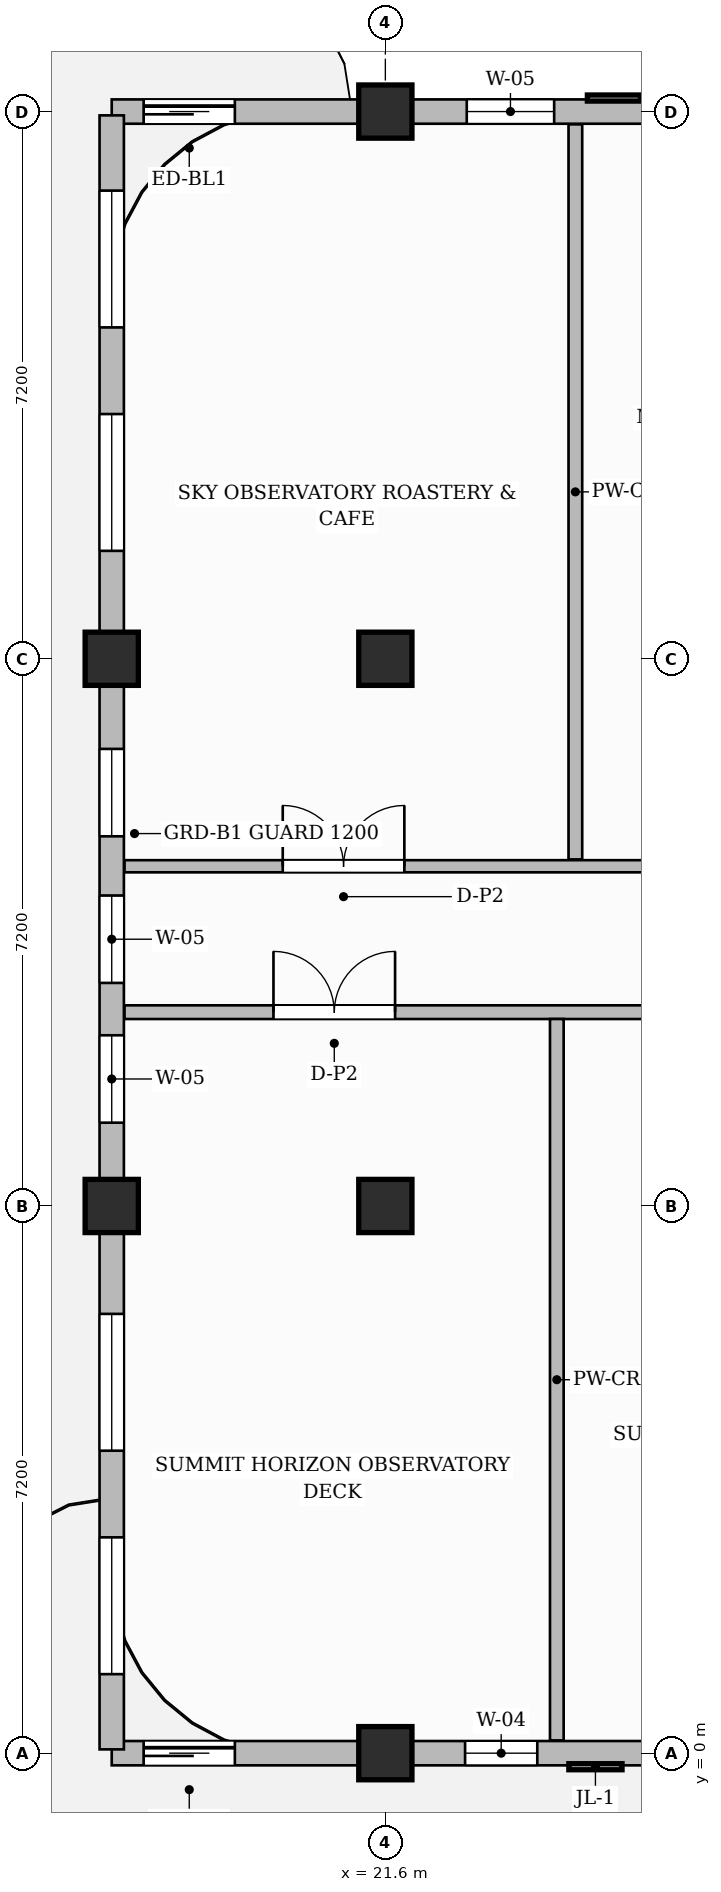
"""IFC4 building model, lengths in metres.
Left out: names, types, materials, properties, quantities, classifications, styles, units other than length and angle.
Written with IfcOpenShell. Run it as: python <this file> out.ifc"""

import sys

from ifc_helpers import new_model, si_unit, direction, frame, frame_2d, origin, origin_2d, place, context, subcontext, project, spatial, rectangle, extrude, source, transform, mapped, element, fill, save


model = new_model("IFC4")
c1 = context("Model", 3, precision=1e-05, world=origin(), true_north=direction((0.0, 1.0)))
c2 = subcontext(c1, "Body", "Model", "MODEL_VIEW")
j1 = project(units=[si_unit("LENGTHUNIT", "METRE"), si_unit("PLANEANGLEUNIT", "RADIAN")], contexts=[c1])
p1 = place(None, origin())
s1 = spatial("IfcSite", under=j1, at=p1, CompositionType="ELEMENT")
p2 = place(p1, origin())
s2 = spatial("IfcBuilding", under=s1, at=p2, CompositionType="ELEMENT")
p3 = place(p2, frame((0.0, 0.0, 294.3)))
s3 = spatial("IfcBuildingStorey", under=s2, at=p3, CompositionType="ELEMENT", Elevation=294.3)
m1 = source(origin(), c2, "Body", "SweptSolid", [
    extrude(rectangle(XDim=0.7, YDim=0.7, at=origin_2d()), origin(), (0.0, 0.0, 1.0), 4.8),
])
for number, where, z_axis, x_axis in (
    (1, (21.6, 0.0, 0.0), (0.0, 0.0, 1.0), (1.0, 0.0, 0.0)),
    (2, (21.6, 7.2, 0.0), (0.0, 0.0, 1.0), (1.0, 0.0, 0.0)),
    (3, (21.6, 14.4, 0.0), (0.0, 0.0, 1.0), (1.0, 0.0, 0.0)),
    (4, (21.6, 21.6, 0.0), (0.0, 0.0, 1.0), (1.0, 0.0, 0.0)),
    (5, (18.0, 7.2, 0.0), (0.0, 0.0, 1.0), (1.0, 0.0, 0.0)),
    (6, (18.0, 14.4, 0.0), (0.0, 0.0, 1.0), (1.0, 0.0, 0.0)),
):
    element("IfcColumn", number, at=place(p3, frame(where, z_axis=z_axis, x_axis=x_axis)), inside=s3, PredefinedType="COLUMN", context=c2, shape_type="MappedRepresentation", body=[
        mapped(m1, transform((0.0, 0.0, 0.0), scale=1.0)),
    ])
p4 = place(p3, frame((18.168, 9.75, 0.0), z_axis=(0.0, 0.0, 1.0), x_axis=(1.0, 0.0, 0.0)))
e7 = element("IfcWall", 7, at=p4, inside=s3, PredefinedType="PARTITIONING", context=c2, shape_type="SweptSolid", body=[
    extrude(rectangle(XDim=11.942, YDim=0.18, at=frame_2d((5.971, 0.0))), origin(), (0.0, 0.0, 1.0), 4.5),
])
p5 = place(p4, frame((1.96, 0.0, 0.0)))
e8 = element("IfcOpeningElement", 8, at=p5, cuts=e7, PredefinedType="OPENING", context=c2, shape_type="SweptSolid", body=[
    extrude(rectangle(XDim=1.6, YDim=2.4, at=frame_2d((0.8, 1.2))), frame((0.0, 0.1, 0.0), z_axis=(0.0, -1.0, 0.0), x_axis=(1.0, 0.0, 0.0)), (0.0, 0.0, 1.0), 0.2),
])
p6 = place(p4, frame((8.06, 0.0, 0.0)))
e9 = element("IfcOpeningElement", 9, at=p6, cuts=e7, PredefinedType="OPENING", context=c2, shape_type="SweptSolid", body=[
    extrude(rectangle(XDim=1.6, YDim=2.4, at=frame_2d((0.8, 1.2))), frame((0.0, 0.1, 0.0), z_axis=(0.0, -1.0, 0.0), x_axis=(1.0, 0.0, 0.0)), (0.0, 0.0, 1.0), 0.2),
])
p7 = place(p3, frame((18.168, 11.67, 0.0), z_axis=(0.0, 0.0, 1.0), x_axis=(1.0, 0.0, 0.0)))
e10 = element("IfcWall", 10, at=p7, inside=s3, PredefinedType="PARTITIONING", context=c2, shape_type="SweptSolid", body=[
    extrude(rectangle(XDim=11.942, YDim=0.16, at=frame_2d((5.971, 0.0))), origin(), (0.0, 0.0, 1.0), 4.5),
])
p8 = place(p7, frame((2.082, 0.0, 0.0)))
e11 = element("IfcOpeningElement", 11, at=p8, cuts=e10, PredefinedType="OPENING", context=c2, shape_type="SweptSolid", body=[
    extrude(rectangle(XDim=1.6, YDim=2.4, at=frame_2d((0.8, 1.2))), frame((0.0, 0.09, 0.0), z_axis=(0.0, -1.0, 0.0), x_axis=(1.0, 0.0, 0.0)), (0.0, 0.0, 1.0), 0.18),
])
p9 = place(p7, frame((8.182, 0.0, 0.0)))
e12 = element("IfcOpeningElement", 12, at=p9, cuts=e10, PredefinedType="OPENING", context=c2, shape_type="SweptSolid", body=[
    extrude(rectangle(XDim=1.6, YDim=2.4, at=frame_2d((0.8, 1.2))), frame((0.0, 0.09, 0.0), z_axis=(0.0, -1.0, 0.0), x_axis=(1.0, 0.0, 0.0)), (0.0, 0.0, 1.0), 0.18),
])
p10 = place(p3, frame((23.856, 0.168, 0.0), z_axis=(0.0, 0.0, 1.0), x_axis=(0.0, 1.0, 0.0)))
e13 = element("IfcWall", 13, at=p10, inside=s3, PredefinedType="PARTITIONING", context=c2, shape_type="SweptSolid", body=[
    extrude(rectangle(XDim=9.492, YDim=0.18, at=frame_2d((4.746, 0.0))), origin(), (0.0, 0.0, 1.0), 4.5),
])
p11 = place(p3, frame((24.1, 11.76, 0.0), z_axis=(0.0, 0.0, 1.0), x_axis=(0.0, 1.0, 0.0)))
e14 = element("IfcWall", 14, at=p11, inside=s3, PredefinedType="PARTITIONING", context=c2, shape_type="SweptSolid", body=[
    extrude(rectangle(XDim=9.672, YDim=0.18, at=frame_2d((4.836, 0.0))), origin(), (0.0, 0.0, 1.0), 4.5),
])
p12 = place(p3, frame((18.0, 0.0, 0.0), z_axis=(0.0, 0.0, 1.0), x_axis=(1.0, 0.0, 0.0)))
e15 = element("IfcWall", 15, at=p12, inside=s3, PredefinedType="SOLIDWALL", context=c2, shape_type="SweptSolid", body=[
    extrude(rectangle(XDim=31.8, YDim=0.32, at=frame_2d((15.9, 0.0))), origin(), (0.0, 0.0, 1.0), 3.785),
])
p13 = place(p12, frame((0.42, 0.0, 0.0)))
e16 = element("IfcOpeningElement", 16, at=p13, cuts=e15, PredefinedType="OPENING", context=c2, shape_type="SweptSolid", body=[
    extrude(rectangle(XDim=1.2, YDim=2.2, at=frame_2d((0.6, 1.1))), frame((0.0, 0.17, 0.0), z_axis=(0.0, -1.0, 0.0), x_axis=(1.0, 0.0, 0.0)), (0.0, 0.0, 1.0), 0.34),
])
p14 = place(p12, frame((4.649, 0.0, 0.8)))
e17 = element("IfcOpeningElement", 17, at=p14, cuts=e15, PredefinedType="OPENING", context=c2, shape_type="SweptSolid", body=[
    extrude(rectangle(XDim=0.95, YDim=1.75, at=frame_2d((0.475, 0.875))), frame((0.0, 0.17, 0.0), z_axis=(0.0, -1.0, 0.0), x_axis=(1.0, 0.0, 0.0)), (0.0, 0.0, 1.0), 0.34),
])
p15 = place(p12, frame((7.032, 0.0, 0.8)))
e18 = element("IfcOpeningElement", 18, at=p15, cuts=e15, PredefinedType="OPENING", context=c2, shape_type="SweptSolid", body=[
    extrude(rectangle(XDim=1.8, YDim=1.85, at=frame_2d((0.9, 0.925))), frame((0.0, 0.17, 0.0), z_axis=(0.0, -1.0, 0.0), x_axis=(1.0, 0.0, 0.0)), (0.0, 0.0, 1.0), 0.34),
])
p16 = place(p12, frame((13.204, 0.0, 0.8)))
e19 = element("IfcOpeningElement", 19, at=p16, cuts=e15, PredefinedType="OPENING", context=c2, shape_type="SweptSolid", body=[
    extrude(rectangle(XDim=1.8, YDim=1.85, at=frame_2d((0.9, 0.925))), frame((0.0, 0.17, 0.0), z_axis=(0.0, -1.0, 0.0), x_axis=(1.0, 0.0, 0.0)), (0.0, 0.0, 1.0), 0.34),
])
p17 = place(p12, frame((17.921, 0.0, 0.8)))
e20 = element("IfcOpeningElement", 20, at=p17, cuts=e15, PredefinedType="OPENING", context=c2, shape_type="SweptSolid", body=[
    extrude(rectangle(XDim=0.95, YDim=1.75, at=frame_2d((0.475, 0.875))), frame((0.0, 0.17, 0.0), z_axis=(0.0, -1.0, 0.0), x_axis=(1.0, 0.0, 0.0)), (0.0, 0.0, 1.0), 0.34),
])
p18 = place(p12, frame((20.304, 0.0, 0.8)))
e21 = element("IfcOpeningElement", 21, at=p18, cuts=e15, PredefinedType="OPENING", context=c2, shape_type="SweptSolid", body=[
    extrude(rectangle(XDim=1.8, YDim=1.85, at=frame_2d((0.9, 0.925))), frame((0.0, 0.17, 0.0), z_axis=(0.0, -1.0, 0.0), x_axis=(1.0, 0.0, 0.0)), (0.0, 0.0, 1.0), 0.34),
])
p19 = place(p12, frame((26.081, 0.0, 0.8)))
e22 = element("IfcOpeningElement", 22, at=p19, cuts=e15, PredefinedType="OPENING", context=c2, shape_type="SweptSolid", body=[
    extrude(rectangle(XDim=1.8, YDim=1.85, at=frame_2d((0.9, 0.925))), frame((0.0, 0.17, 0.0), z_axis=(0.0, -1.0, 0.0), x_axis=(1.0, 0.0, 0.0)), (0.0, 0.0, 1.0), 0.34),
])
p20 = place(p12, frame((28.727, 0.0, 0.8)))
e23 = element("IfcOpeningElement", 23, at=p20, cuts=e15, PredefinedType="OPENING", context=c2, shape_type="SweptSolid", body=[
    extrude(rectangle(XDim=1.8, YDim=1.85, at=frame_2d((0.9, 0.925))), frame((0.0, 0.17, 0.0), z_axis=(0.0, -1.0, 0.0), x_axis=(1.0, 0.0, 0.0)), (0.0, 0.0, 1.0), 0.34),
])
p21 = place(p3, frame((18.0, 21.6, 0.0), z_axis=(0.0, 0.0, 1.0), x_axis=(1.0, 0.0, 0.0)))
e24 = element("IfcWall", 24, at=p21, inside=s3, PredefinedType="SOLIDWALL", context=c2, shape_type="SweptSolid", body=[
    extrude(rectangle(XDim=31.8, YDim=0.32, at=frame_2d((15.9, 0.0))), origin(), (0.0, 0.0, 1.0), 3.785),
])
p22 = place(p21, frame((0.42, 0.0, 0.0)))
e25 = element("IfcOpeningElement", 25, at=p22, cuts=e24, PredefinedType="OPENING", context=c2, shape_type="SweptSolid", body=[
    extrude(rectangle(XDim=1.2, YDim=2.2, at=frame_2d((0.6, 1.1))), frame((0.0, 0.17, 0.0), z_axis=(0.0, -1.0, 0.0), x_axis=(1.0, 0.0, 0.0)), (0.0, 0.0, 1.0), 0.34),
])
p23 = place(p21, frame((4.671, 0.0, 0.8)))
e26 = element("IfcOpeningElement", 26, at=p23, cuts=e24, PredefinedType="OPENING", context=c2, shape_type="SweptSolid", body=[
    extrude(rectangle(XDim=1.15, YDim=1.8, at=frame_2d((0.575, 0.9))), frame((0.0, 0.17, 0.0), z_axis=(0.0, -1.0, 0.0), x_axis=(1.0, 0.0, 0.0)), (0.0, 0.0, 1.0), 0.34),
])
p24 = place(p21, frame((7.154, 0.0, 0.8)))
e27 = element("IfcOpeningElement", 27, at=p24, cuts=e24, PredefinedType="OPENING", context=c2, shape_type="SweptSolid", body=[
    extrude(rectangle(XDim=1.8, YDim=1.85, at=frame_2d((0.9, 0.925))), frame((0.0, 0.17, 0.0), z_axis=(0.0, -1.0, 0.0), x_axis=(1.0, 0.0, 0.0)), (0.0, 0.0, 1.0), 0.34),
])
p25 = place(p21, frame((12.95, 0.0, 0.8)))
e28 = element("IfcOpeningElement", 28, at=p25, cuts=e24, PredefinedType="OPENING", context=c2, shape_type="SweptSolid", body=[
    extrude(rectangle(XDim=1.8, YDim=1.85, at=frame_2d((0.9, 0.925))), frame((0.0, 0.17, 0.0), z_axis=(0.0, -1.0, 0.0), x_axis=(1.0, 0.0, 0.0)), (0.0, 0.0, 1.0), 0.34),
])
p26 = place(p21, frame((18.596, 0.0, 0.8)))
e29 = element("IfcOpeningElement", 29, at=p26, cuts=e24, PredefinedType="OPENING", context=c2, shape_type="SweptSolid", body=[
    extrude(rectangle(XDim=1.8, YDim=1.85, at=frame_2d((0.9, 0.925))), frame((0.0, 0.17, 0.0), z_axis=(0.0, -1.0, 0.0), x_axis=(1.0, 0.0, 0.0)), (0.0, 0.0, 1.0), 0.34),
])
p27 = place(p21, frame((21.729, 0.0, 0.8)))
e30 = element("IfcOpeningElement", 30, at=p27, cuts=e24, PredefinedType="OPENING", context=c2, shape_type="SweptSolid", body=[
    extrude(rectangle(XDim=1.15, YDim=1.8, at=frame_2d((0.575, 0.9))), frame((0.0, 0.17, 0.0), z_axis=(0.0, -1.0, 0.0), x_axis=(1.0, 0.0, 0.0)), (0.0, 0.0, 1.0), 0.34),
])
p28 = place(p21, frame((25.121, 0.0, 0.8)))
e31 = element("IfcOpeningElement", 31, at=p28, cuts=e24, PredefinedType="OPENING", context=c2, shape_type="SweptSolid", body=[
    extrude(rectangle(XDim=0.95, YDim=1.75, at=frame_2d((0.475, 0.875))), frame((0.0, 0.17, 0.0), z_axis=(0.0, -1.0, 0.0), x_axis=(1.0, 0.0, 0.0)), (0.0, 0.0, 1.0), 0.34),
])
p29 = place(p21, frame((27.804, 0.0, 0.8)))
e32 = element("IfcOpeningElement", 32, at=p29, cuts=e24, PredefinedType="OPENING", context=c2, shape_type="SweptSolid", body=[
    extrude(rectangle(XDim=1.8, YDim=1.85, at=frame_2d((0.9, 0.925))), frame((0.0, 0.17, 0.0), z_axis=(0.0, -1.0, 0.0), x_axis=(1.0, 0.0, 0.0)), (0.0, 0.0, 1.0), 0.34),
])
p30 = place(p3, frame((18.0, 0.05, 0.0), z_axis=(0.0, 0.0, 1.0), x_axis=(0.0, 1.0, 0.0)))
e33 = element("IfcWall", 33, at=p30, inside=s3, PredefinedType="SOLIDWALL", context=c2, shape_type="SweptSolid", body=[
    extrude(rectangle(XDim=21.5, YDim=0.32, at=frame_2d((10.75, 0.0))), origin(), (0.0, 0.0, 1.0), 4.5),
])
p31 = place(p30, frame((0.99, 0.0, 0.8)))
e34 = element("IfcOpeningElement", 34, at=p31, cuts=e33, PredefinedType="OPENING", context=c2, shape_type="SweptSolid", body=[
    extrude(rectangle(XDim=1.8, YDim=1.85, at=frame_2d((0.9, 0.925))), frame((0.0, 0.17, 0.0), z_axis=(0.0, -1.0, 0.0), x_axis=(1.0, 0.0, 0.0)), (0.0, 0.0, 1.0), 0.34),
])
p32 = place(p30, frame((3.93, 0.0, 0.8)))
e35 = element("IfcOpeningElement", 35, at=p32, cuts=e33, PredefinedType="OPENING", context=c2, shape_type="SweptSolid", body=[
    extrude(rectangle(XDim=1.8, YDim=1.85, at=frame_2d((0.9, 0.925))), frame((0.0, 0.17, 0.0), z_axis=(0.0, -1.0, 0.0), x_axis=(1.0, 0.0, 0.0)), (0.0, 0.0, 1.0), 0.34),
])
p33 = place(p30, frame((8.246, 0.0, 0.8)))
e36 = element("IfcOpeningElement", 36, at=p33, cuts=e33, PredefinedType="OPENING", context=c2, shape_type="SweptSolid", body=[
    extrude(rectangle(XDim=1.15, YDim=1.8, at=frame_2d((0.575, 0.9))), frame((0.0, 0.17, 0.0), z_axis=(0.0, -1.0, 0.0), x_axis=(1.0, 0.0, 0.0)), (0.0, 0.0, 1.0), 0.34),
])
p34 = place(p30, frame((10.085, 0.0, 0.8)))
e37 = element("IfcOpeningElement", 37, at=p34, cuts=e33, PredefinedType="OPENING", context=c2, shape_type="SweptSolid", body=[
    extrude(rectangle(XDim=1.15, YDim=1.8, at=frame_2d((0.575, 0.9))), frame((0.0, 0.17, 0.0), z_axis=(0.0, -1.0, 0.0), x_axis=(1.0, 0.0, 0.0)), (0.0, 0.0, 1.0), 0.34),
])
p35 = place(p30, frame((12.014, 0.0, 0.8)))
e38 = element("IfcOpeningElement", 38, at=p35, cuts=e33, PredefinedType="OPENING", context=c2, shape_type="SweptSolid", body=[
    extrude(rectangle(XDim=1.15, YDim=1.8, at=frame_2d((0.575, 0.9))), frame((0.0, 0.17, 0.0), z_axis=(0.0, -1.0, 0.0), x_axis=(1.0, 0.0, 0.0)), (0.0, 0.0, 1.0), 0.34),
])
p36 = place(p30, frame((15.77, 0.0, 0.8)))
e39 = element("IfcOpeningElement", 39, at=p36, cuts=e33, PredefinedType="OPENING", context=c2, shape_type="SweptSolid", body=[
    extrude(rectangle(XDim=1.8, YDim=1.85, at=frame_2d((0.9, 0.925))), frame((0.0, 0.17, 0.0), z_axis=(0.0, -1.0, 0.0), x_axis=(1.0, 0.0, 0.0)), (0.0, 0.0, 1.0), 0.34),
])
p37 = place(p30, frame((18.71, 0.0, 0.8)))
e40 = element("IfcOpeningElement", 40, at=p37, cuts=e33, PredefinedType="OPENING", context=c2, shape_type="SweptSolid", body=[
    extrude(rectangle(XDim=1.8, YDim=1.85, at=frame_2d((0.9, 0.925))), frame((0.0, 0.17, 0.0), z_axis=(0.0, -1.0, 0.0), x_axis=(1.0, 0.0, 0.0)), (0.0, 0.0, 1.0), 0.34),
])
m2 = source(origin(), c2, "Body", "SweptSolid", [
    extrude(rectangle(XDim=1.6, YDim=2.4, at=frame_2d((0.8, 1.2))), frame((0.0, 0.025, 0.0), z_axis=(0.0, -1.0, 0.0), x_axis=(1.0, 0.0, 0.0)), (0.0, 0.0, 1.0), 0.05),
])
p38 = place(p5, origin())
e41 = element("IfcDoor", 41, at=p38, inside=s3, OperationType="DOUBLE_DOOR_SINGLE_SWING", PredefinedType="DOOR", context=c2, shape_type="MappedRepresentation", body=[
    mapped(m2, transform((0.0, 0.0, 0.0), scale=1.0)),
])
fill(e8, e41)
p39 = place(p8, origin())
e42 = element("IfcDoor", 42, at=p39, inside=s3, OperationType="DOUBLE_DOOR_SINGLE_SWING", PredefinedType="DOOR", context=c2, shape_type="MappedRepresentation", body=[
    mapped(m2, transform((0.0, 0.0, 0.0), scale=1.0)),
])
fill(e11, e42)
m3 = source(origin(), c2, "Body", "SweptSolid", [
    extrude(rectangle(XDim=1.2, YDim=2.2, at=frame_2d((0.6, 1.1))), frame((0.0, 0.025, 0.0), z_axis=(0.0, -1.0, 0.0), x_axis=(1.0, 0.0, 0.0)), (0.0, 0.0, 1.0), 0.05),
])
p40 = place(p13, origin())
e43 = element("IfcDoor", 43, at=p40, inside=s3, OperationType="SLIDING_TO_LEFT", PredefinedType="DOOR", context=c2, shape_type="MappedRepresentation", body=[
    mapped(m3, transform((0.0, 0.0, 0.0), scale=1.0)),
])
fill(e16, e43)
p41 = place(p22, origin())
e44 = element("IfcDoor", 44, at=p41, inside=s3, OperationType="SLIDING_TO_LEFT", PredefinedType="DOOR", context=c2, shape_type="MappedRepresentation", body=[
    mapped(m3, transform((0.0, 0.0, 0.0), scale=1.0)),
])
fill(e25, e44)
m4 = source(origin(), c2, "Body", "SweptSolid", [
    extrude(rectangle(XDim=0.95, YDim=1.75, at=frame_2d((0.475, 0.875))), frame((0.0, 0.03, 0.0), z_axis=(0.0, -1.0, 0.0), x_axis=(1.0, 0.0, 0.0)), (0.0, 0.0, 1.0), 0.06),
])
p42 = place(p14, origin())
e45 = element("IfcWindow", 45, at=p42, inside=s3, PartitioningType="SINGLE_PANEL", PredefinedType="WINDOW", context=c2, shape_type="MappedRepresentation", body=[
    mapped(m4, transform((0.0, 0.0, 0.0), scale=1.0)),
])
fill(e17, e45)
m5 = source(origin(), c2, "Body", "SweptSolid", [
    extrude(rectangle(XDim=1.15, YDim=1.8, at=frame_2d((0.575, 0.9))), frame((0.0, 0.03, 0.0), z_axis=(0.0, -1.0, 0.0), x_axis=(1.0, 0.0, 0.0)), (0.0, 0.0, 1.0), 0.06),
])
p43 = place(p23, origin())
e46 = element("IfcWindow", 46, at=p43, inside=s3, PartitioningType="SINGLE_PANEL", PredefinedType="WINDOW", context=c2, shape_type="MappedRepresentation", body=[
    mapped(m5, transform((0.0, 0.0, 0.0), scale=1.0)),
])
fill(e26, e46)
m6 = source(origin(), c2, "Body", "SweptSolid", [
    extrude(rectangle(XDim=1.8, YDim=1.85, at=frame_2d((0.9, 0.925))), frame((0.0, 0.03, 0.0), z_axis=(0.0, -1.0, 0.0), x_axis=(1.0, 0.0, 0.0)), (0.0, 0.0, 1.0), 0.06),
])
p44 = place(p31, origin())
e47 = element("IfcWindow", 47, at=p44, inside=s3, PartitioningType="DOUBLE_PANEL_VERTICAL", PredefinedType="WINDOW", context=c2, shape_type="MappedRepresentation", body=[
    mapped(m6, transform((0.0, 0.0, 0.0), scale=1.0)),
])
fill(e34, e47)
p45 = place(p32, origin())
e48 = element("IfcWindow", 48, at=p45, inside=s3, PartitioningType="DOUBLE_PANEL_VERTICAL", PredefinedType="WINDOW", context=c2, shape_type="MappedRepresentation", body=[
    mapped(m6, transform((0.0, 0.0, 0.0), scale=1.0)),
])
fill(e35, e48)
p46 = place(p33, origin())
e49 = element("IfcWindow", 49, at=p46, inside=s3, PartitioningType="SINGLE_PANEL", PredefinedType="WINDOW", context=c2, shape_type="MappedRepresentation", body=[
    mapped(m5, transform((0.0, 0.0, 0.0), scale=1.0)),
])
fill(e36, e49)
p47 = place(p34, origin())
e50 = element("IfcWindow", 50, at=p47, inside=s3, PartitioningType="SINGLE_PANEL", PredefinedType="WINDOW", context=c2, shape_type="MappedRepresentation", body=[
    mapped(m5, transform((0.0, 0.0, 0.0), scale=1.0)),
])
fill(e37, e50)
p48 = place(p35, origin())
e51 = element("IfcWindow", 51, at=p48, inside=s3, PartitioningType="SINGLE_PANEL", PredefinedType="WINDOW", context=c2, shape_type="MappedRepresentation", body=[
    mapped(m5, transform((0.0, 0.0, 0.0), scale=1.0)),
])
fill(e38, e51)
p49 = place(p36, origin())
e52 = element("IfcWindow", 52, at=p49, inside=s3, PartitioningType="DOUBLE_PANEL_VERTICAL", PredefinedType="WINDOW", context=c2, shape_type="MappedRepresentation", body=[
    mapped(m6, transform((0.0, 0.0, 0.0), scale=1.0)),
])
fill(e39, e52)
p50 = place(p37, origin())
e53 = element("IfcWindow", 53, at=p50, inside=s3, PartitioningType="DOUBLE_PANEL_VERTICAL", PredefinedType="WINDOW", context=c2, shape_type="MappedRepresentation", body=[
    mapped(m6, transform((0.0, 0.0, 0.0), scale=1.0)),
])
fill(e40, e53)
save(model, sys.argv[1])
